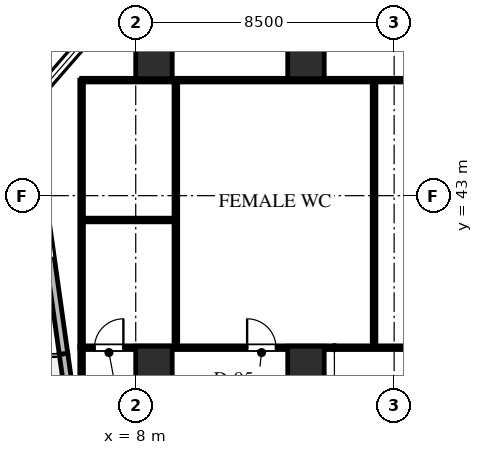
"""IFC4 building model, lengths in metres.
Left out: names, types, materials, properties, quantities, classifications, styles, units other than length and angle.
Written with IfcOpenShell. Run it as: python <this file> out.ifc"""

import sys

from ifc_helpers import new_model, si_unit, direction, frame, frame_2d, origin, origin_2d, place, context, subcontext, project, spatial, rectangle, extrude, element, fill, save


model = new_model("IFC4")
c1 = context("Model", 3, precision=1e-05, world=origin(), true_north=direction((0.0, 1.0)))
c2 = subcontext(c1, "Body", "Model", "MODEL_VIEW")
j1 = project(units=[si_unit("LENGTHUNIT", "METRE"), si_unit("PLANEANGLEUNIT", "RADIAN")], contexts=[c1])
p1 = place(None, origin())
s1 = spatial("IfcSite", under=j1, at=p1, CompositionType="ELEMENT")
p2 = place(p1, origin())
s2 = spatial("IfcBuilding", under=s1, at=p2, CompositionType="ELEMENT")
p3 = place(p2, frame((0.0, 0.0, 29.5)))
s3 = spatial("IfcBuildingStorey", under=s2, at=p3, CompositionType="ELEMENT", Elevation=29.5)
for number, where, z_axis, x_axis in (
    (1, (13.6, 37.35, 0.0), (0.0, 0.0, 1.0), (1.0, 0.0, 0.0)),
    (2, (13.6, 47.55, 0.0), (0.0, 0.0, 1.0), (1.0, 0.0, 0.0)),
    (3, (8.6, 37.35, 0.0), (0.0, 0.0, 1.0), (1.0, 0.0, 0.0)),
    (4, (8.6, 47.55, 0.0), (0.0, 0.0, 1.0), (1.0, 0.0, 0.0)),
):
    element("IfcColumn", number, at=place(p3, frame(where, z_axis=z_axis, x_axis=x_axis)), inside=s3, PredefinedType="COLUMN", context=c2, shape_type="SweptSolid", body=[
        extrude(rectangle(XDim=1.2, YDim=1.4, at=origin_2d()), origin(), (0.0, 0.0, 1.0), 4.0),
    ])
p4 = place(p3, frame((10.44, 3.537, 0.0), z_axis=(0.0, 0.0, 1.0), x_axis=(-0.139174610616, 0.990267856572, 0.0)))
e5 = element("IfcWall", 5, at=p4, inside=s3, PredefinedType="STANDARD", context=c2, shape_type="SweptSolid", body=[
    extrude(rectangle(XDim=34.6, YDim=0.28, at=frame_2d((17.3, 0.0))), origin(), (0.0, 0.0, 1.0), 3.74),
])
p5 = place(p4, frame((16.75, 0.0, 0.0)))
e6 = element("IfcOpeningElement", 6, at=p5, cuts=e5, PredefinedType="OPENING", context=c2, shape_type="SweptSolid", body=[
    extrude(rectangle(XDim=1.1, YDim=2.2, at=frame_2d((0.55, 1.1))), frame((0.0, 0.15, 0.0), z_axis=(0.0, -1.0, 0.0), x_axis=(1.0, 0.0, 0.0)), (0.0, 0.0, 1.0), 0.3),
])
p6 = place(p4, frame((6.614, 0.0, 0.65)))
e7 = element("IfcOpeningElement", 7, at=p6, cuts=e5, PredefinedType="OPENING", context=c2, shape_type="SweptSolid", body=[
    extrude(rectangle(XDim=1.8, YDim=2.1, at=frame_2d((0.9, 1.05))), frame((0.0, 0.15, 0.0), z_axis=(0.0, -1.0, 0.0), x_axis=(1.0, 0.0, 0.0)), (0.0, 0.0, 1.0), 0.3),
])
p7 = place(p3, frame((5.625, 37.8, 0.0), z_axis=(0.0, 0.0, 1.0), x_axis=(-0.139180172484, 0.990267074878, 0.0)))
e8 = element("IfcWall", 8, at=p7, inside=s3, PredefinedType="STANDARD", context=c2, shape_type="SweptSolid", body=[
    extrude(rectangle(XDim=8.267, YDim=0.28, at=frame_2d((4.134, 0.0))), origin(), (0.0, 0.0, 1.0), 3.74),
])
p8 = place(p7, frame((3.173, 0.0, 0.65)))
e9 = element("IfcOpeningElement", 9, at=p8, cuts=e8, PredefinedType="OPENING", context=c2, shape_type="SweptSolid", body=[
    extrude(rectangle(XDim=1.8, YDim=2.1, at=frame_2d((0.9, 1.05))), frame((0.0, 0.15, 0.0), z_axis=(0.0, -1.0, 0.0), x_axis=(1.0, 0.0, 0.0)), (0.0, 0.0, 1.0), 0.3),
])
p9 = place(p3, frame((4.474, 45.987, 0.0), z_axis=(0.0, 0.0, 1.0), x_axis=(0.656070053895, 0.754699996278, 0.0)))
e10 = element("IfcWall", 10, at=p9, inside=s3, PredefinedType="STANDARD", context=c2, shape_type="SweptSolid", body=[
    extrude(rectangle(XDim=3.171, YDim=0.28, at=frame_2d((1.585, 0.0))), origin(), (0.0, 0.0, 1.0), 3.74),
])
p10 = place(p9, frame((0.667, 0.0, 0.65)))
e11 = element("IfcOpeningElement", 11, at=p10, cuts=e10, PredefinedType="OPENING", context=c2, shape_type="SweptSolid", body=[
    extrude(rectangle(XDim=1.8, YDim=2.1, at=frame_2d((0.9, 1.05))), frame((0.0, 0.15, 0.0), z_axis=(0.0, -1.0, 0.0), x_axis=(1.0, 0.0, 0.0)), (0.0, 0.0, 1.0), 0.3),
])
p11 = place(p3, frame((6.22, 38.0, 0.0), z_axis=(0.0, 0.0, 1.0), x_axis=(1.0, 0.0, 0.0)))
e12 = element("IfcWall", 12, at=p11, inside=s3, PredefinedType="PARTITIONING", context=c2, shape_type="SweptSolid", body=[
    extrude(rectangle(XDim=16.63, YDim=0.12, at=frame_2d((8.315, 0.0))), origin(), (0.0, 0.0, 1.0), 2.813),
])
p12 = place(p11, frame((0.424, 0.0, 0.0)))
e13 = element("IfcOpeningElement", 13, at=p12, cuts=e12, PredefinedType="OPENING", context=c2, shape_type="SweptSolid", body=[
    extrude(rectangle(XDim=0.95, YDim=2.15, at=frame_2d((0.475, 1.075))), frame((0.0, 0.07, 0.0), z_axis=(0.0, -1.0, 0.0), x_axis=(1.0, 0.0, 0.0)), (0.0, 0.0, 1.0), 0.14),
])
p13 = place(p11, frame((5.444, 0.0, 0.0)))
e14 = element("IfcOpeningElement", 14, at=p13, cuts=e12, PredefinedType="OPENING", context=c2, shape_type="SweptSolid", body=[
    extrude(rectangle(XDim=0.95, YDim=2.15, at=frame_2d((0.475, 1.075))), frame((0.0, 0.07, 0.0), z_axis=(0.0, -1.0, 0.0), x_axis=(1.0, 0.0, 0.0)), (0.0, 0.0, 1.0), 0.14),
])
p14 = place(p11, frame((13.344, 0.0, 0.0)))
e15 = element("IfcOpeningElement", 15, at=p14, cuts=e12, PredefinedType="OPENING", context=c2, shape_type="SweptSolid", body=[
    extrude(rectangle(XDim=0.95, YDim=2.15, at=frame_2d((0.475, 1.075))), frame((0.0, 0.07, 0.0), z_axis=(0.0, -1.0, 0.0), x_axis=(1.0, 0.0, 0.0)), (0.0, 0.0, 1.0), 0.14),
])
p15 = place(p3, frame((6.22, 38.0, 0.0), z_axis=(0.0, 0.0, 1.0), x_axis=(0.0, 1.0, 0.0)))
e16 = element("IfcWall", 16, at=p15, inside=s3, PredefinedType="PARTITIONING", context=c2, shape_type="SweptSolid", body=[
    extrude(rectangle(XDim=8.8, YDim=0.12, at=frame_2d((4.4, 0.0))), origin(), (0.0, 0.0, 1.0), 3.74),
])
p16 = place(p3, frame((6.22, 46.8, 0.0), z_axis=(0.0, 0.0, 1.0), x_axis=(1.0, 0.0, 0.0)))
e17 = element("IfcWall", 17, at=p16, inside=s3, PredefinedType="PARTITIONING", context=c2, shape_type="SweptSolid", body=[
    extrude(rectangle(XDim=16.68, YDim=0.12, at=frame_2d((8.34, 0.0))), origin(), (0.0, 0.0, 1.0), 2.813),
])
for number, where, z_axis, x_axis in (
    (18, (9.32, 38.068, 0.0), (0.0, 0.0, 1.0), (0.0, 1.0, 0.0)),
    (19, (15.84, 38.068, 0.0), (0.0, 0.0, 1.0), (0.0, 1.0, 0.0)),
):
    element("IfcWall", number, at=place(p3, frame(where, z_axis=z_axis, x_axis=x_axis)), inside=s3, PredefinedType="PARTITIONING", context=c2, shape_type="SweptSolid", body=[
        extrude(rectangle(XDim=8.664, YDim=0.12, at=frame_2d((4.332, 0.0))), origin(), (0.0, 0.0, 1.0), 3.74),
    ])
p17 = place(p3, frame((6.288, 42.2, 0.0), z_axis=(0.0, 0.0, 1.0), x_axis=(1.0, 0.0, 0.0)))
e20 = element("IfcWall", 20, at=p17, inside=s3, PredefinedType="PARTITIONING", context=c2, shape_type="SweptSolid", body=[
    extrude(rectangle(XDim=2.964, YDim=0.12, at=frame_2d((1.482, 0.0))), origin(), (0.0, 0.0, 1.0), 2.813),
])
p18 = place(p3, frame((6.22, 34.751, 0.0), z_axis=(0.0, 0.0, 1.0), x_axis=(0.0, 1.0, 0.0)))
e21 = element("IfcWall", 21, at=p18, inside=s3, PredefinedType="PARTITIONING", context=c2, shape_type="SweptSolid", body=[
    extrude(rectangle(XDim=3.299, YDim=0.12, at=frame_2d((1.649, 0.0))), origin(), (0.0, 0.0, 1.0), 3.74),
])
p19 = place(p10, origin())
e22 = element("IfcWindow", 22, at=p19, inside=s3, PartitioningType="SINGLE_PANEL", PredefinedType="WINDOW", context=c2, shape_type="SweptSolid", body=[
    extrude(rectangle(XDim=1.8, YDim=2.1, at=frame_2d((0.9, 1.05))), frame((0.0, 0.03, 0.0), z_axis=(0.0, -1.0, 0.0), x_axis=(1.0, 0.0, 0.0)), (0.0, 0.0, 1.0), 0.06),
])
fill(e11, e22)
p20 = place(p12, origin())
e23 = element("IfcDoor", 23, at=p20, inside=s3, OperationType="SINGLE_SWING_RIGHT", PredefinedType="DOOR", context=c2, shape_type="SweptSolid", body=[
    extrude(rectangle(XDim=0.95, YDim=2.15, at=frame_2d((0.475, 1.075))), frame((0.0, 0.025, 0.0), z_axis=(0.0, -1.0, 0.0), x_axis=(1.0, 0.0, 0.0)), (0.0, 0.0, 1.0), 0.05),
])
fill(e13, e23)
p21 = place(p13, origin())
e24 = element("IfcDoor", 24, at=p21, inside=s3, OperationType="SINGLE_SWING_LEFT", PredefinedType="DOOR", context=c2, shape_type="SweptSolid", body=[
    extrude(rectangle(XDim=0.95, YDim=2.15, at=frame_2d((0.475, 1.075))), frame((0.0, 0.025, 0.0), z_axis=(0.0, -1.0, 0.0), x_axis=(1.0, 0.0, 0.0)), (0.0, 0.0, 1.0), 0.05),
])
fill(e14, e24)
save(model, sys.argv[1])
